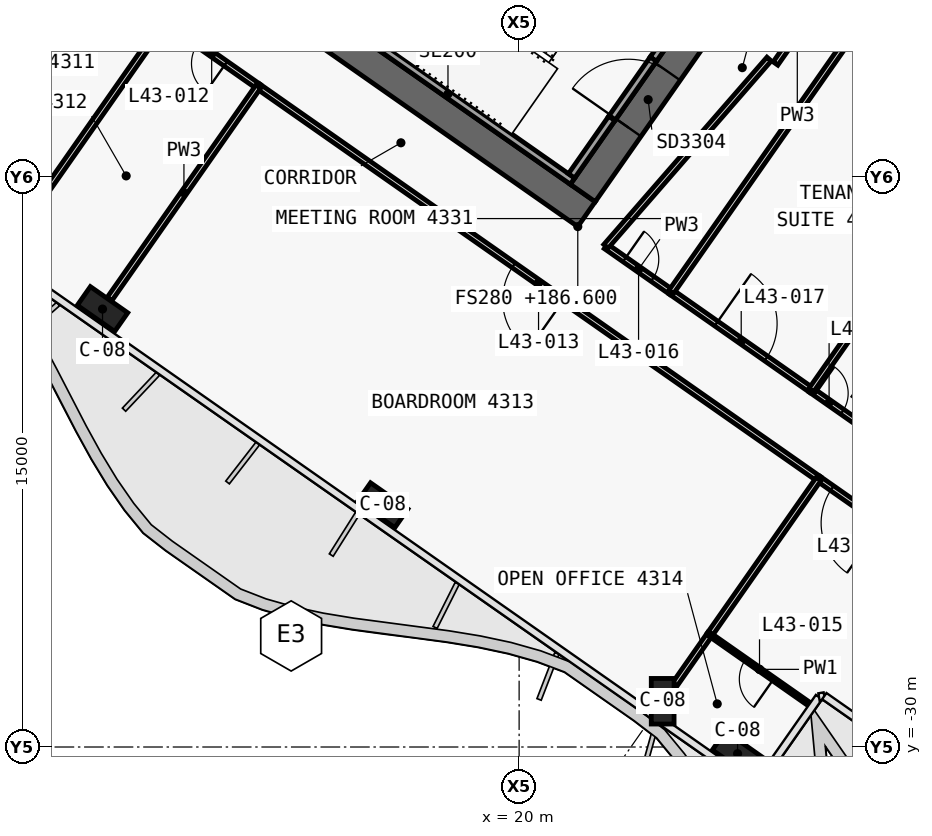
"""IFC4 building model, lengths in metres.
Left out: names, types, materials, properties, quantities, classifications, styles, units other than length and angle.
Written with IfcOpenShell. Run it as: python <this file> out.ifc"""

import sys

from ifc_helpers import new_model, si_unit, direction, frame, frame_2d, origin, origin_2d, place, context, subcontext, project, spatial, polyline, rectangle, outline, extrude, clip, halfspace, element, fill, save


model = new_model("IFC4")
c1 = context("Model", 3, precision=1e-05, world=origin(), true_north=direction((0.0, 1.0)))
c2 = subcontext(c1, "Body", "Model", "MODEL_VIEW")
j1 = project(units=[si_unit("LENGTHUNIT", "METRE"), si_unit("PLANEANGLEUNIT", "RADIAN")], contexts=[c1])
p1 = place(None, origin())
s1 = spatial("IfcSite", under=j1, at=p1, CompositionType="ELEMENT")
p2 = place(p1, origin())
s2 = spatial("IfcBuilding", under=s1, at=p2, CompositionType="ELEMENT")
p3 = place(p2, frame((0.0, 0.0, 186.6)))
s3 = spatial("IfcBuildingStorey", under=s2, at=p3, CompositionType="ELEMENT", Elevation=186.6)
p4 = place(p3, frame((-0.029, -0.712, 0.0), z_axis=(0.0, 0.0, 1.0), x_axis=(0.819151758019, -0.573576845187, 0.0)))
e1 = element("IfcWall", 1, at=p4, inside=s3, PredefinedType="SHEAR", context=c2, shape_type="SweptSolid", body=[
    extrude(outline(polyline([(26.616, 0.4), (-0.0, 0.4), (0.56, -0.4), (26.616, -0.4), (26.616, 0.4)])), origin(), (0.0, 0.0, 1.0), 3.9),
])
p5 = place(p4, frame((1.166, 0.0, 0.0)))
e2 = element("IfcOpeningElement", 2, at=p5, cuts=e1, PredefinedType="OPENING", context=c2, shape_type="SweptSolid", body=[
    extrude(rectangle(XDim=1.5, YDim=2.1, at=frame_2d((0.75, 1.05))), frame((0.0, 0.41, 0.0), z_axis=(0.0, -1.0, 0.0), x_axis=(1.0, 0.0, 0.0)), (0.0, 0.0, 1.0), 0.82),
])
p6 = place(p4, frame((12.366, 0.0, 0.0)))
e3 = element("IfcOpeningElement", 3, at=p6, cuts=e1, PredefinedType="OPENING", context=c2, shape_type="SweptSolid", body=[
    extrude(rectangle(XDim=1.5, YDim=2.1, at=frame_2d((0.75, 1.05))), frame((0.0, 0.41, 0.0), z_axis=(0.0, -1.0, 0.0), x_axis=(1.0, 0.0, 0.0)), (0.0, 0.0, 1.0), 0.82),
])
p7 = place(p3, frame((21.675, -15.421, 0.0), z_axis=(0.0, 0.0, 1.0), x_axis=(0.573581815061, 0.819148278049, 0.0)))
e4 = element("IfcWall", 4, at=p7, inside=s3, PredefinedType="SHEAR", context=c2, shape_type="SweptSolid", body=[
    extrude(outline(polyline([(9.6, 0.4), (0.0, 0.4), (0.0, -0.4), (9.6, -0.4), (9.6, 0.4)])), origin(), (0.0, 0.0, 1.0), 3.9),
])
p8 = place(p7, frame((6.3, 0.0, 0.0)))
e5 = element("IfcOpeningElement", 5, at=p8, cuts=e4, PredefinedType="OPENING", context=c2, shape_type="SweptSolid", body=[
    extrude(rectangle(XDim=1.8, YDim=2.1, at=frame_2d((0.9, 1.05))), frame((0.0, 0.41, 0.0), z_axis=(0.0, -1.0, 0.0), x_axis=(1.0, 0.0, 0.0)), (0.0, 0.0, 1.0), 0.82),
])
p9 = place(p7, frame((2.1, 0.0, 0.0)))
e6 = element("IfcOpeningElement", 6, at=p9, cuts=e4, PredefinedType="OPENING", context=c2, shape_type="SweptSolid", body=[
    extrude(rectangle(XDim=1.8, YDim=2.1, at=frame_2d((0.9, 1.05))), frame((0.0, 0.41, 0.0), z_axis=(0.0, -1.0, 0.0), x_axis=(1.0, 0.0, 0.0)), (0.0, 0.0, 1.0), 0.82),
])
for number, where, z_axis, x_axis in (
    (7, (9.038, -18.475, 0.0), (0.0, 0.0, 1.0), (0.819, -0.574, 0.0)),
    (8, (16.41, -23.637, 0.0), (0.0, 0.0, 1.0), (0.819, -0.574, 0.0)),
):
    element("IfcColumn", number, at=place(p3, frame(where, z_axis=z_axis, x_axis=x_axis)), inside=s3, PredefinedType="COLUMN", context=c2, shape_type="SweptSolid", body=[
        extrude(rectangle(XDim=1.2, YDim=0.6, at=origin_2d()), origin(), (0.0, 0.0, 1.0), 3.9),
    ])
p10 = place(p3, frame((23.782, -28.799, -0.0), z_axis=(-0.083515095002, 0.058505570787, 0.99478757888), x_axis=(0.814755419354, -0.570767845737, 0.101968980118)))
e9 = element("IfcColumn", 9, at=p10, inside=s3, PredefinedType="COLUMN", context=c2, shape_type="Clipping", body=[
    clip(clip(extrude(rectangle(XDim=1.2, YDim=0.6, at=origin_2d()), origin(), (0.0, 0.0, 1.0), 3.92), halfspace(frame((0.0, 0.0, 0.062), z_axis=(0.0, 0.0, 1.0), x_axis=(1.0, 0.0, 0.0)), True)), halfspace(frame((0.0, 0.0, 3.859), z_axis=(0.0, 0.0, 1.0), x_axis=(1.0, 0.0, 0.0)), False)),
])
p11 = place(p3, frame((25.748, -30.176, 0.0), z_axis=(0.0, 0.0, 1.0), x_axis=(0.819152044289, -0.573576436351, 0.0)))
e10 = element("IfcColumn", 10, at=p11, inside=s3, PredefinedType="COLUMN", context=c2, shape_type="SweptSolid", body=[
    extrude(rectangle(XDim=1.2, YDim=0.6, at=origin_2d()), origin(), (0.0, 0.0, 1.0), 3.62),
])
p12 = place(p3, frame((30.553, -29.329, -0.0), z_axis=(-0.477747821975, 0.334512857575, 0.812316543421), x_axis=(0.573565197047, 0.819159914019, 0.0)))
e11 = element("IfcColumn", 11, at=p12, inside=s3, PredefinedType="COLUMN", context=c2, shape_type="Clipping", body=[
    clip(clip(extrude(rectangle(XDim=1.2, YDim=0.6, at=origin_2d()), origin(), (0.0, 0.0, 1.0), 4.801), halfspace(frame((0.0, 0.0, 0.215), z_axis=(0.0, 0.0, 1.0), x_axis=(1.0, 0.0, 0.0)), True)), halfspace(frame((0.0, 0.0, 4.586), z_axis=(0.0, 0.0, 1.0), x_axis=(1.0, 0.0, 0.0)), False)),
])
p13 = place(p3, frame((14.851, -10.521, 0.0), z_axis=(0.0, 0.0, 1.0), x_axis=(0.819141584393, -0.57359137434, 0.0)))
e12 = element("IfcWall", 12, at=p13, inside=s3, PredefinedType="SOLIDWALL", context=c2, shape_type="SweptSolid", body=[
    extrude(rectangle(XDim=8.0, YDim=0.2, at=frame_2d((4.0, 0.0))), origin(), (0.0, 0.0, 1.0), 3.62),
])
p14 = place(p3, frame((21.38, -14.97, 0.0), z_axis=(0.0, 0.0, 1.0), x_axis=(0.573559770908, 0.819163713305, 0.0)))
e13 = element("IfcWall", 13, at=p14, inside=s3, PredefinedType="SOLIDWALL", context=c2, shape_type="SweptSolid", body=[
    extrude(rectangle(XDim=1.85, YDim=0.2, at=frame_2d((0.925, 0.0))), origin(), (0.0, 0.0, 1.0), 3.62),
])
p15 = place(p3, frame((23.531, -11.898, 0.0), z_axis=(0.0, 0.0, 1.0), x_axis=(0.573708088123, 0.819059844958, 0.0)))
e14 = element("IfcWall", 14, at=p15, inside=s3, PredefinedType="SOLIDWALL", context=c2, shape_type="SweptSolid", body=[
    extrude(rectangle(XDim=0.6, YDim=0.2, at=frame_2d((0.3, 0.0))), origin(), (0.0, 0.0, 1.0), 3.62),
])
p16 = place(p3, frame((22.441, -13.455, 2.15), z_axis=(0.0, 0.0, 1.0), x_axis=(0.573591692345, 0.819141361715, 0.0)))
e15 = element("IfcWall", 15, at=p16, inside=s3, PredefinedType="SOLIDWALL", context=c2, shape_type="SweptSolid", body=[
    extrude(rectangle(XDim=1.9, YDim=0.2, at=frame_2d((0.95, 0.0))), origin(), (0.0, 0.0, 1.0), 1.47),
])
p17 = place(p3, frame((22.283, -16.824, 0.0), z_axis=(0.0, 0.0, 1.0), x_axis=(0.819182738768, -0.573532597595, 0.0)))
e16 = element("IfcWall", 16, at=p17, inside=s3, PredefinedType="PARTITIONING", context=c2, shape_type="SweptSolid", body=[
    extrude(rectangle(XDim=2.099, YDim=0.15, at=frame_2d((1.05, 0.0))), origin(), (0.0, 0.0, 1.0), 3.62),
])
p18 = place(p17, frame((0.6, 0.0, 0.0)))
e17 = element("IfcOpeningElement", 17, at=p18, cuts=e16, PredefinedType="OPENING", context=c2, shape_type="SweptSolid", body=[
    extrude(rectangle(XDim=0.9, YDim=2.1, at=frame_2d((0.45, 1.05))), frame((0.0, 0.085, 0.0), z_axis=(0.0, -1.0, 0.0), x_axis=(1.0, 0.0, 0.0)), (0.0, 0.0, 1.0), 0.17),
])
p19 = place(p3, frame((23.999, -18.025, 0.0), z_axis=(0.0, 0.0, 1.0), x_axis=(0.819165703328, -0.573556928727, 0.0)))
e18 = element("IfcWall", 18, at=p19, inside=s3, PredefinedType="PARTITIONING", context=c2, shape_type="SweptSolid", body=[
    extrude(rectangle(XDim=4.504, YDim=0.15, at=frame_2d((2.252, 0.0))), origin(), (0.0, 0.0, 1.0), 3.62),
])
p20 = place(p19, frame((1.452, 0.0, 0.0)))
e19 = element("IfcOpeningElement", 19, at=p20, cuts=e18, PredefinedType="OPENING", context=c2, shape_type="SweptSolid", body=[
    extrude(rectangle(XDim=1.6, YDim=2.1, at=frame_2d((0.8, 1.05))), frame((0.0, 0.085, 0.0), z_axis=(0.0, -1.0, 0.0), x_axis=(1.0, 0.0, 0.0)), (0.0, 0.0, 1.0), 0.17),
])
p21 = place(p3, frame((27.686, -20.606, 0.0), z_axis=(0.0, 0.0, 1.0), x_axis=(0.81916700466, -0.573555070134, 0.0)))
e20 = element("IfcWall", 20, at=p21, inside=s3, PredefinedType="PARTITIONING", context=c2, shape_type="SweptSolid", body=[
    extrude(rectangle(XDim=3.004, YDim=0.15, at=frame_2d((1.502, 0.0))), origin(), (0.0, 0.0, 1.0), 3.0),
])
p22 = place(p21, frame((0.15, 0.0, 0.0)))
e21 = element("IfcOpeningElement", 21, at=p22, cuts=e20, PredefinedType="OPENING", context=c2, shape_type="SweptSolid", body=[
    extrude(rectangle(XDim=0.85, YDim=2.1, at=frame_2d((0.425, 1.05))), frame((0.0, 0.085, 0.0), z_axis=(0.0, -1.0, 0.0), x_axis=(1.0, 0.0, 0.0)), (0.0, 0.0, 1.0), 0.17),
])
p23 = place(p3, frame((13.14, -12.619, 0.0), z_axis=(0.0, 0.0, 1.0), x_axis=(-0.819128818764, 0.573609604409, 0.0)))
e22 = element("IfcWall", 22, at=p23, inside=s3, PredefinedType="PARTITIONING", context=c2, shape_type="SweptSolid", body=[
    extrude(rectangle(XDim=3.004, YDim=0.15, at=frame_2d((1.502, 0.0))), origin(), (0.0, 0.0, 1.0), 3.0),
])
p24 = place(p23, frame((1.052, 0.0, 0.0)))
e23 = element("IfcOpeningElement", 23, at=p24, cuts=e22, PredefinedType="OPENING", context=c2, shape_type="SweptSolid", body=[
    extrude(rectangle(XDim=0.9, YDim=2.1, at=frame_2d((0.45, 1.05))), frame((0.0, 0.085, 0.0), z_axis=(0.0, -1.0, 0.0), x_axis=(1.0, 0.0, 0.0)), (0.0, 0.0, 1.0), 0.17),
])
p25 = place(p3, frame((27.885, -22.944, 0.0), z_axis=(0.0, 0.0, 1.0), x_axis=(-0.81914845568, 0.573581561381, 0.0)))
e24 = element("IfcWall", 24, at=p25, inside=s3, PredefinedType="PARTITIONING", context=c2, shape_type="SweptSolid", body=[
    extrude(rectangle(XDim=18.004, YDim=0.15, at=frame_2d((9.002, 0.0))), origin(), (0.0, 0.0, 1.0), 3.0),
])
p26 = place(p25, frame((8.202, 0.0, 0.0)))
e25 = element("IfcOpeningElement", 25, at=p26, cuts=e24, PredefinedType="OPENING", context=c2, shape_type="SweptSolid", body=[
    extrude(rectangle(XDim=1.6, YDim=2.1, at=frame_2d((0.8, 1.05))), frame((0.0, 0.085, 0.0), z_axis=(0.0, -1.0, 0.0), x_axis=(1.0, 0.0, 0.0)), (0.0, 0.0, 1.0), 0.17),
])
p27 = place(p3, frame((29.9, -24.354, 0.0), z_axis=(0.0, 0.0, 1.0), x_axis=(-0.819166750642, 0.57355543293, 0.0)))
e26 = element("IfcWall", 26, at=p27, inside=s3, PredefinedType="PARTITIONING", context=c2, shape_type="SweptSolid", body=[
    extrude(rectangle(XDim=2.464, YDim=0.15, at=frame_2d((1.232, 0.0))), origin(), (0.0, 0.0, 1.0), 3.62),
])
p28 = place(p27, frame((0.432, 0.0, 0.0)))
e27 = element("IfcOpeningElement", 27, at=p28, cuts=e26, PredefinedType="OPENING", context=c2, shape_type="SweptSolid", body=[
    extrude(rectangle(XDim=1.6, YDim=2.1, at=frame_2d((0.8, 1.05))), frame((0.0, 0.085, 0.0), z_axis=(0.0, -1.0, 0.0), x_axis=(1.0, 0.0, 0.0)), (0.0, 0.0, 1.0), 0.17),
])
p29 = place(p3, frame((28.876, -11.064, 0.0), z_axis=(0.0, 0.0, 1.0), x_axis=(-0.573591492816, -0.819141501433, 0.0)))
e28 = element("IfcWall", 28, at=p29, inside=s3, PredefinedType="PARTITIONING", context=c2, shape_type="SweptSolid", body=[
    extrude(rectangle(XDim=8.5, YDim=0.15, at=frame_2d((4.25, 0.0))), origin(), (0.0, 0.0, 1.0), 3.0),
])
p30 = place(p3, frame((22.285, -16.825, 0.0), z_axis=(0.0, 0.0, 1.0), x_axis=(0.656781429942, 0.754080999153, 0.0)))
e29 = element("IfcWall", 29, at=p30, inside=s3, PredefinedType="PARTITIONING", context=c2, shape_type="SweptSolid", body=[
    extrude(rectangle(XDim=6.536, YDim=0.15, at=frame_2d((3.268, 0.0))), origin(), (0.0, 0.0, 1.0), 3.62),
])
p31 = place(p3, frame((26.746, -12.014, 0.0), z_axis=(0.0, 0.0, 1.0), x_axis=(0.573568836472, 0.819157365729, 0.0)))
e30 = element("IfcWall", 30, at=p31, inside=s3, PredefinedType="PARTITIONING", context=c2, shape_type="SweptSolid", body=[
    extrude(rectangle(XDim=2.0, YDim=0.15, at=frame_2d((1.0, 0.0))), origin(), (0.0, 0.0, 1.0), 3.0),
])
p32 = place(p3, frame((32.562, -13.645, 0.0), z_axis=(0.0, 0.0, 1.0), x_axis=(-0.573572219642, -0.819154996844, 0.0)))
e31 = element("IfcWall", 31, at=p32, inside=s3, PredefinedType="PARTITIONING", context=c2, shape_type="SweptSolid", body=[
    extrude(rectangle(XDim=8.5, YDim=0.15, at=frame_2d((4.25, 0.0))), origin(), (0.0, 0.0, 1.0), 3.0),
])
p33 = place(p3, frame((10.681, -10.897, 0.0), z_axis=(0.0, 0.0, 1.0), x_axis=(-0.57358249317, -0.819147803225, 0.0)))
e32 = element("IfcWall", 32, at=p33, inside=s3, PredefinedType="PARTITIONING", context=c2, shape_type="SweptSolid", body=[
    extrude(rectangle(XDim=7.5, YDim=0.15, at=frame_2d((3.75, 0.0))), origin(), (0.0, 0.0, 1.0), 2.9),
])
p34 = place(p3, frame((13.139, -12.618, 0.0), z_axis=(0.0, 0.0, 1.0), x_axis=(-0.573560698343, -0.819163063936, 0.0)))
e33 = element("IfcWall", 33, at=p34, inside=s3, PredefinedType="PARTITIONING", context=c2, shape_type="SweptSolid", body=[
    extrude(rectangle(XDim=6.83, YDim=0.15, at=frame_2d((3.415, 0.0))), origin(), (0.0, 0.0, 1.0), 3.0),
])
p35 = place(p3, frame((25.016, -27.037, 0.0), z_axis=(0.0, 0.0, 1.0), x_axis=(-0.573615752353, -0.819124513522, 0.0)))
e34 = element("IfcWall", 34, at=p35, inside=s3, PredefinedType="PARTITIONING", context=c2, shape_type="SweptSolid", body=[
    extrude(rectangle(XDim=1.602, YDim=0.15, at=frame_2d((0.801, 0.0))), origin(), (0.0, 0.0, 1.0), 2.9),
])
p36 = place(p3, frame((27.884, -22.942, 0.0), z_axis=(0.0, 0.0, 1.0), x_axis=(-0.573590089534, -0.819142484058, 0.0)))
e35 = element("IfcWall", 35, at=p36, inside=s3, PredefinedType="PARTITIONING", context=c2, shape_type="SweptSolid", body=[
    extrude(rectangle(XDim=5.002, YDim=0.15, at=frame_2d((2.501, 0.0))), origin(), (0.0, 0.0, 1.0), 3.62),
])
p37 = place(p3, frame((27.636, -28.875, 0.0), z_axis=(0.0, 0.0, 1.0), x_axis=(-0.819156644649, 0.573569866301, 0.0)))
e36 = element("IfcWall", 36, at=p37, inside=s3, PredefinedType="PARTITIONING", context=c2, shape_type="SweptSolid", body=[
    extrude(rectangle(XDim=3.2, YDim=0.1, at=frame_2d((1.6, 0.0))), origin(), (0.0, 0.0, 1.0), 2.9),
])
p38 = place(p37, frame((1.15, 0.0, 0.0)))
e37 = element("IfcOpeningElement", 37, at=p38, cuts=e36, PredefinedType="OPENING", context=c2, shape_type="SweptSolid", body=[
    extrude(rectangle(XDim=0.9, YDim=2.1, at=frame_2d((0.45, 1.05))), frame((0.0, 0.06, 0.0), z_axis=(0.0, -1.0, 0.0), x_axis=(1.0, 0.0, 0.0)), (0.0, 0.0, 1.0), 0.12),
])
p39 = place(p9, origin())
e38 = element("IfcDoor", 38, at=p39, inside=s3, OperationType="DOUBLE_DOOR_SINGLE_SWING", PredefinedType="DOOR", context=c2, shape_type="SweptSolid", body=[
    extrude(rectangle(XDim=1.8, YDim=2.1, at=frame_2d((0.9, 1.05))), frame((0.0, 0.025, 0.0), z_axis=(0.0, -1.0, 0.0), x_axis=(1.0, 0.0, 0.0)), (0.0, 0.0, 1.0), 0.05),
])
fill(e6, e38)
p40 = place(p24, origin())
e39 = element("IfcDoor", 39, at=p40, inside=s3, OperationType="SINGLE_SWING_LEFT", PredefinedType="DOOR", context=c2, shape_type="SweptSolid", body=[
    extrude(rectangle(XDim=0.9, YDim=2.1, at=frame_2d((0.45, 1.05))), frame((0.0, 0.025, 0.0), z_axis=(0.0, -1.0, 0.0), x_axis=(1.0, 0.0, 0.0)), (0.0, 0.0, 1.0), 0.05),
])
fill(e23, e39)
p41 = place(p26, origin())
e40 = element("IfcDoor", 40, at=p41, inside=s3, OperationType="DOUBLE_DOOR_SINGLE_SWING", PredefinedType="DOOR", context=c2, shape_type="SweptSolid", body=[
    extrude(rectangle(XDim=1.6, YDim=2.1, at=frame_2d((0.8, 1.05))), frame((0.0, 0.025, 0.0), z_axis=(0.0, -1.0, 0.0), x_axis=(1.0, 0.0, 0.0)), (0.0, 0.0, 1.0), 0.05),
])
fill(e25, e40)
p42 = place(p28, origin())
e41 = element("IfcDoor", 41, at=p42, inside=s3, OperationType="DOUBLE_DOOR_SINGLE_SWING", PredefinedType="DOOR", context=c2, shape_type="SweptSolid", body=[
    extrude(rectangle(XDim=1.6, YDim=2.1, at=frame_2d((0.8, 1.05))), frame((0.0, 0.025, 0.0), z_axis=(0.0, -1.0, 0.0), x_axis=(1.0, 0.0, 0.0)), (0.0, 0.0, 1.0), 0.05),
])
fill(e27, e41)
p43 = place(p38, origin())
e42 = element("IfcDoor", 42, at=p43, inside=s3, OperationType="SINGLE_SWING_LEFT", PredefinedType="DOOR", context=c2, shape_type="SweptSolid", body=[
    extrude(rectangle(XDim=0.9, YDim=2.1, at=frame_2d((0.45, 1.05))), frame((0.0, 0.025, 0.0), z_axis=(0.0, -1.0, 0.0), x_axis=(1.0, 0.0, 0.0)), (0.0, 0.0, 1.0), 0.05),
])
fill(e37, e42)
p44 = place(p18, origin())
e43 = element("IfcDoor", 43, at=p44, inside=s3, OperationType="SINGLE_SWING_RIGHT", PredefinedType="DOOR", context=c2, shape_type="SweptSolid", body=[
    extrude(rectangle(XDim=0.9, YDim=2.1, at=frame_2d((0.45, 1.05))), frame((0.0, 0.025, 0.0), z_axis=(0.0, -1.0, 0.0), x_axis=(1.0, 0.0, 0.0)), (0.0, 0.0, 1.0), 0.05),
])
fill(e17, e43)
p45 = place(p20, origin())
e44 = element("IfcDoor", 44, at=p45, inside=s3, OperationType="DOUBLE_DOOR_SINGLE_SWING", PredefinedType="DOOR", context=c2, shape_type="SweptSolid", body=[
    extrude(rectangle(XDim=1.6, YDim=2.1, at=frame_2d((0.8, 1.05))), frame((0.0, 0.025, 0.0), z_axis=(0.0, -1.0, 0.0), x_axis=(1.0, 0.0, 0.0)), (0.0, 0.0, 1.0), 0.05),
])
fill(e19, e44)
p46 = place(p22, origin())
e45 = element("IfcDoor", 45, at=p46, inside=s3, OperationType="SINGLE_SWING_RIGHT", PredefinedType="DOOR", context=c2, shape_type="SweptSolid", body=[
    extrude(rectangle(XDim=0.85, YDim=2.1, at=frame_2d((0.425, 1.05))), frame((0.0, 0.025, 0.0), z_axis=(0.0, -1.0, 0.0), x_axis=(1.0, 0.0, 0.0)), (0.0, 0.0, 1.0), 0.05),
])
fill(e21, e45)
save(model, sys.argv[1])
